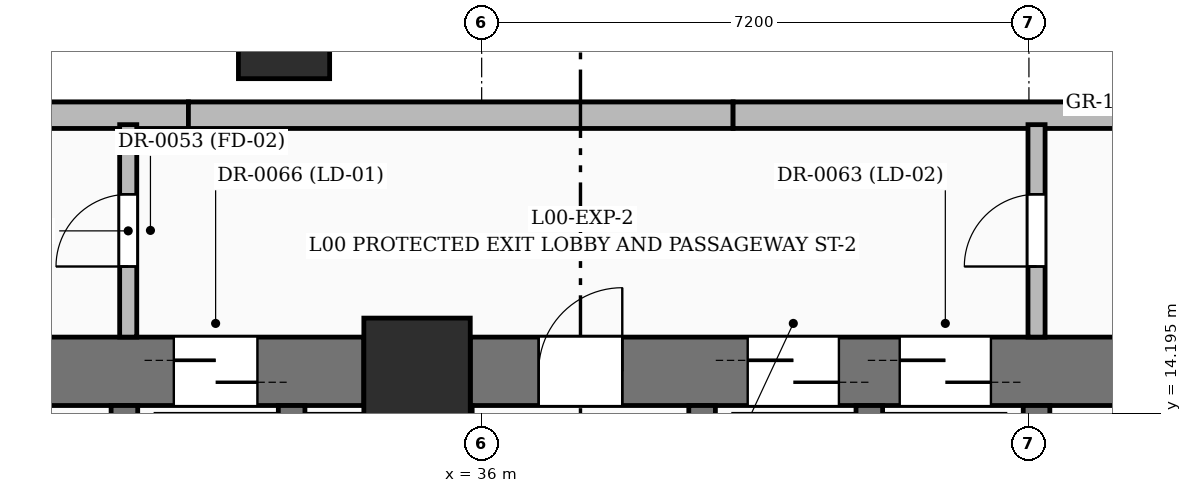
"""IFC4 building model, lengths in metres.
Left out: names, types, materials, properties, quantities, classifications, styles, units other than length and angle.
Written with IfcOpenShell. Run it as: python <this file> out.ifc"""

import sys

from ifc_helpers import new_model, si_unit, direction, frame, frame_2d, origin, origin_2d, place, context, subcontext, project, spatial, rectangle, extrude, element, fill, save


model = new_model("IFC4")
c1 = context("Model", 3, precision=1e-05, world=origin(), true_north=direction((0.0, 1.0)))
c2 = subcontext(c1, "Body", "Model", "MODEL_VIEW")
j1 = project(units=[si_unit("LENGTHUNIT", "METRE"), si_unit("PLANEANGLEUNIT", "RADIAN")], contexts=[c1])
p1 = place(None, origin())
s1 = spatial("IfcSite", under=j1, at=p1, CompositionType="ELEMENT")
p2 = place(p1, origin())
s2 = spatial("IfcBuilding", under=s1, at=p2, CompositionType="ELEMENT")
p3 = place(p2, origin())
s3 = spatial("IfcBuildingStorey", under=s2, at=p3, CompositionType="ELEMENT", Elevation=0.0)
p4 = place(p3, frame((35.15, 14.75, 0.0), z_axis=(0.0, 0.0, 1.0), x_axis=(1.0, 0.0, 0.0)))
e1 = element("IfcColumn", 1, at=p4, inside=s3, PredefinedType="COLUMN", context=c2, shape_type="SweptSolid", body=[
    extrude(rectangle(XDim=1.4, YDim=1.4, at=origin_2d()), origin(), (0.0, 0.0, 1.0), 8.4),
])
p5 = place(p3, frame((33.4, 19.2, 0.0), z_axis=(0.0, 0.0, 1.0), x_axis=(1.0, 0.0, 0.0)))
e2 = element("IfcColumn", 2, at=p5, inside=s3, PredefinedType="COLUMN", context=c2, shape_type="SweptSolid", body=[
    extrude(rectangle(XDim=1.2, YDim=1.2, at=origin_2d()), origin(), (0.0, 0.0, 1.0), 8.4),
])
p6 = place(p3, frame((28.25, 14.75, 0.0), z_axis=(0.0, 0.0, 1.0), x_axis=(1.0, 0.0, 0.0)))
e3 = element("IfcWall", 3, at=p6, inside=s3, PredefinedType="SHEAR", context=c2, shape_type="SweptSolid", body=[
    extrude(rectangle(XDim=6.2, YDim=0.9, at=frame_2d((3.1, 0.0))), origin(), (0.0, 0.0, 1.0), 8.4),
])
p7 = place(p6, frame((0.9, 0.0, 0.0)))
e4 = element("IfcOpeningElement", 4, at=p7, cuts=e3, PredefinedType="OPENING", context=c2, shape_type="SweptSolid", body=[
    extrude(rectangle(XDim=1.1, YDim=2.2, at=frame_2d((0.55, 1.1))), frame((0.0, 0.46, 0.0), z_axis=(0.0, -1.0, 0.0), x_axis=(1.0, 0.0, 0.0)), (0.0, 0.0, 1.0), 0.92),
])
p8 = place(p6, frame((3.7, 0.0, 0.0)))
e5 = element("IfcOpeningElement", 5, at=p8, cuts=e3, PredefinedType="OPENING", context=c2, shape_type="SweptSolid", body=[
    extrude(rectangle(XDim=1.1, YDim=2.2, at=frame_2d((0.55, 1.1))), frame((0.0, 0.46, 0.0), z_axis=(0.0, -1.0, 0.0), x_axis=(1.0, 0.0, 0.0)), (0.0, 0.0, 1.0), 0.92),
])
p9 = place(p3, frame((35.85, 14.75, 0.0), z_axis=(0.0, 0.0, 1.0), x_axis=(1.0, 0.0, 0.0)))
e6 = element("IfcWall", 6, at=p9, inside=s3, PredefinedType="SHEAR", context=c2, shape_type="SweptSolid", body=[
    extrude(rectangle(XDim=10.5, YDim=0.9, at=frame_2d((5.25, 0.0))), origin(), (0.0, 0.0, 1.0), 8.4),
])
p10 = place(p9, frame((0.9, 0.0, 0.0)))
e7 = element("IfcOpeningElement", 7, at=p10, cuts=e6, PredefinedType="OPENING", context=c2, shape_type="SweptSolid", body=[
    extrude(rectangle(XDim=1.1, YDim=2.2, at=frame_2d((0.55, 1.1))), frame((0.0, 0.46, 0.0), z_axis=(0.0, -1.0, 0.0), x_axis=(1.0, 0.0, 0.0)), (0.0, 0.0, 1.0), 0.92),
])
p11 = place(p9, frame((8.5, 0.0, 0.0)))
e8 = element("IfcOpeningElement", 8, at=p11, cuts=e6, PredefinedType="OPENING", context=c2, shape_type="SweptSolid", body=[
    extrude(rectangle(XDim=1.1, YDim=2.2, at=frame_2d((0.55, 1.1))), frame((0.0, 0.46, 0.0), z_axis=(0.0, -1.0, 0.0), x_axis=(1.0, 0.0, 0.0)), (0.0, 0.0, 1.0), 0.92),
])
p12 = place(p9, frame((3.65, 0.0, 0.0)))
e9 = element("IfcOpeningElement", 9, at=p12, cuts=e6, PredefinedType="OPENING", context=c2, shape_type="SweptSolid", body=[
    extrude(rectangle(XDim=1.2, YDim=2.2, at=frame_2d((0.6, 1.1))), frame((0.0, 0.46, 0.0), z_axis=(0.0, -1.0, 0.0), x_axis=(1.0, 0.0, 0.0)), (0.0, 0.0, 1.0), 0.92),
])
p13 = place(p9, frame((5.65, 0.0, 0.0)))
e10 = element("IfcOpeningElement", 10, at=p13, cuts=e6, PredefinedType="OPENING", context=c2, shape_type="SweptSolid", body=[
    extrude(rectangle(XDim=1.2, YDim=2.2, at=frame_2d((0.6, 1.1))), frame((0.0, 0.46, 0.0), z_axis=(0.0, -1.0, 0.0), x_axis=(1.0, 0.0, 0.0)), (0.0, 0.0, 1.0), 0.92),
])
p14 = place(p3, frame((31.3, 5.2, 0.0), z_axis=(0.0, 0.0, 1.0), x_axis=(0.0, 1.0, 0.0)))
e11 = element("IfcWall", 11, at=p14, inside=s3, PredefinedType="SOLIDWALL", context=c2, shape_type="SweptSolid", body=[
    extrude(rectangle(XDim=9.1, YDim=0.35, at=frame_2d((4.55, 0.0))), origin(), (0.0, 0.0, 1.0), 8.4),
])
p15 = place(p14, frame((6.02, 0.0, 0.0)))
e12 = element("IfcOpeningElement", 12, at=p15, cuts=e11, PredefinedType="OPENING", context=c2, shape_type="SweptSolid", body=[
    extrude(rectangle(XDim=1.0, YDim=2.15, at=frame_2d((0.5, 1.075))), frame((0.0, 0.185, 0.0), z_axis=(0.0, -1.0, 0.0), x_axis=(1.0, 0.0, 0.0)), (0.0, 0.0, 1.0), 0.37),
])
p16 = place(p3, frame((35.7, 5.2, 0.0), z_axis=(0.0, 0.0, 1.0), x_axis=(0.0, 1.0, 0.0)))
e13 = element("IfcWall", 13, at=p16, inside=s3, PredefinedType="SOLIDWALL", context=c2, shape_type="SweptSolid", body=[
    extrude(rectangle(XDim=9.1, YDim=0.35, at=frame_2d((4.55, 0.0))), origin(), (0.0, 0.0, 1.0), 8.4),
])
p17 = place(p16, frame((6.02, 0.0, 0.0)))
e14 = element("IfcOpeningElement", 14, at=p17, cuts=e13, PredefinedType="OPENING", context=c2, shape_type="SweptSolid", body=[
    extrude(rectangle(XDim=1.0, YDim=2.15, at=frame_2d((0.5, 1.075))), frame((0.0, 0.185, 0.0), z_axis=(0.0, -1.0, 0.0), x_axis=(1.0, 0.0, 0.0)), (0.0, 0.0, 1.0), 0.37),
])
p18 = place(p3, frame((38.9, 5.2, 0.0), z_axis=(0.0, 0.0, 1.0), x_axis=(0.0, 1.0, 0.0)))
e15 = element("IfcWall", 15, at=p18, inside=s3, PredefinedType="SOLIDWALL", context=c2, shape_type="SweptSolid", body=[
    extrude(rectangle(XDim=9.1, YDim=0.35, at=frame_2d((4.55, 0.0))), origin(), (0.0, 0.0, 1.0), 8.4),
])
p19 = place(p18, frame((6.02, 0.0, 0.0)))
e16 = element("IfcOpeningElement", 16, at=p19, cuts=e15, PredefinedType="OPENING", context=c2, shape_type="SweptSolid", body=[
    extrude(rectangle(XDim=1.0, YDim=2.15, at=frame_2d((0.5, 1.075))), frame((0.0, 0.185, 0.0), z_axis=(0.0, -1.0, 0.0), x_axis=(1.0, 0.0, 0.0)), (0.0, 0.0, 1.0), 0.37),
])
p20 = place(p3, frame((43.3, 5.2, 0.0), z_axis=(0.0, 0.0, 1.0), x_axis=(0.0, 1.0, 0.0)))
e17 = element("IfcWall", 17, at=p20, inside=s3, PredefinedType="SOLIDWALL", context=c2, shape_type="SweptSolid", body=[
    extrude(rectangle(XDim=9.1, YDim=0.35, at=frame_2d((4.55, 0.0))), origin(), (0.0, 0.0, 1.0), 8.4),
])
p21 = place(p20, frame((6.02, 0.0, 0.0)))
e18 = element("IfcOpeningElement", 18, at=p21, cuts=e17, PredefinedType="OPENING", context=c2, shape_type="SweptSolid", body=[
    extrude(rectangle(XDim=1.0, YDim=2.15, at=frame_2d((0.5, 1.075))), frame((0.0, 0.185, 0.0), z_axis=(0.0, -1.0, 0.0), x_axis=(1.0, 0.0, 0.0)), (0.0, 0.0, 1.0), 0.37),
])
for number, where, z_axis, x_axis in (
    (19, (33.5, 12.375, 0.0), (0.0, 0.0, 1.0), (0.0, 1.0, 0.0)),
    (20, (41.1, 12.375, 0.0), (0.0, 0.0, 1.0), (0.0, 1.0, 0.0)),
):
    element("IfcWall", number, at=place(p3, frame(where, z_axis=z_axis, x_axis=x_axis)), inside=s3, PredefinedType="SOLIDWALL", context=c2, shape_type="SweptSolid", body=[
        extrude(rectangle(XDim=1.925, YDim=0.35, at=frame_2d((0.962, 0.0))), origin(), (0.0, 0.0, 1.0), 8.4),
    ])
p22 = place(p3, frame((24.976, 18.12, 0.0), z_axis=(0.0, 0.0, 1.0), x_axis=(1.0, 0.0, 0.0)))
e21 = element("IfcWall", 21, at=p22, inside=s3, PredefinedType="SOLIDWALL", context=c2, shape_type="SweptSolid", body=[
    extrude(rectangle(XDim=7.166, YDim=0.35, at=frame_2d((3.583, 0.0))), origin(), (0.0, 0.0, 1.0), 7.467),
])
for number, where, z_axis, x_axis in (
    (22, (32.142, 18.12, 0.0), (0.0, 0.0, 1.0), (1.0, 0.0, 0.0)),
    (23, (39.308, 18.12, 0.0), (0.0, 0.0, 1.0), (1.0, 0.0, 0.0)),
):
    element("IfcWall", number, at=place(p3, frame(where, z_axis=z_axis, x_axis=x_axis)), inside=s3, PredefinedType="SOLIDWALL", context=c2, shape_type="SweptSolid", body=[
        extrude(rectangle(XDim=7.166, YDim=0.35, at=frame_2d((3.583, 0.0))), origin(), (0.0, 0.0, 1.0), 7.064),
    ])
p23 = place(p3, frame((31.35, 15.2, 0.0), z_axis=(0.0, 0.0, 1.0), x_axis=(0.0, 1.0, 0.0)))
e24 = element("IfcWall", 24, at=p23, inside=s3, PredefinedType="PARTITIONING", context=c2, shape_type="SweptSolid", body=[
    extrude(rectangle(XDim=2.795, YDim=0.225, at=frame_2d((1.397, 0.0))), origin(), (0.0, 0.0, 1.0), 8.1),
])
p24 = place(p23, frame((0.929, 0.0, 0.0)))
e25 = element("IfcOpeningElement", 25, at=p24, cuts=e24, PredefinedType="OPENING", context=c2, shape_type="SweptSolid", body=[
    extrude(rectangle(XDim=0.95, YDim=2.15, at=frame_2d((0.475, 1.075))), frame((0.0, 0.123, 0.0), z_axis=(0.0, -1.0, 0.0), x_axis=(1.0, 0.0, 0.0)), (0.0, 0.0, 1.0), 0.245),
])
p25 = place(p3, frame((43.3, 15.2, 0.0), z_axis=(0.0, 0.0, 1.0), x_axis=(0.0, 1.0, 0.0)))
e26 = element("IfcWall", 26, at=p25, inside=s3, PredefinedType="PARTITIONING", context=c2, shape_type="SweptSolid", body=[
    extrude(rectangle(XDim=2.795, YDim=0.225, at=frame_2d((1.397, 0.0))), origin(), (0.0, 0.0, 1.0), 8.1),
])
p26 = place(p25, frame((0.929, 0.0, 0.0)))
e27 = element("IfcOpeningElement", 27, at=p26, cuts=e26, PredefinedType="OPENING", context=c2, shape_type="SweptSolid", body=[
    extrude(rectangle(XDim=0.95, YDim=2.15, at=frame_2d((0.475, 1.075))), frame((0.0, 0.123, 0.0), z_axis=(0.0, -1.0, 0.0), x_axis=(1.0, 0.0, 0.0)), (0.0, 0.0, 1.0), 0.245),
])
p27 = place(p10, origin())
e28 = element("IfcDoor", 28, at=p27, inside=s3, OperationType="SINGLE_SWING_RIGHT", PredefinedType="DOOR", context=c2, shape_type="SweptSolid", body=[
    extrude(rectangle(XDim=1.1, YDim=2.2, at=frame_2d((0.55, 1.1))), frame((0.0, 0.025, 0.0), z_axis=(0.0, -1.0, 0.0), x_axis=(1.0, 0.0, 0.0)), (0.0, 0.0, 1.0), 0.05),
])
fill(e7, e28)
p28 = place(p8, origin())
e29 = element("IfcDoor", 29, at=p28, inside=s3, OperationType="DOUBLE_DOOR_SLIDING", PredefinedType="DOOR", context=c2, shape_type="SweptSolid", body=[
    extrude(rectangle(XDim=1.1, YDim=2.2, at=frame_2d((0.55, 1.1))), frame((0.0, 0.025, 0.0), z_axis=(0.0, -1.0, 0.0), x_axis=(1.0, 0.0, 0.0)), (0.0, 0.0, 1.0), 0.05),
])
fill(e5, e29)
p29 = place(p12, origin())
e30 = element("IfcDoor", 30, at=p29, inside=s3, OperationType="DOUBLE_DOOR_SLIDING", PredefinedType="DOOR", context=c2, shape_type="SweptSolid", body=[
    extrude(rectangle(XDim=1.2, YDim=2.2, at=frame_2d((0.6, 1.1))), frame((0.0, 0.025, 0.0), z_axis=(0.0, -1.0, 0.0), x_axis=(1.0, 0.0, 0.0)), (0.0, 0.0, 1.0), 0.05),
])
fill(e9, e30)
p30 = place(p13, origin())
e31 = element("IfcDoor", 31, at=p30, inside=s3, OperationType="DOUBLE_DOOR_SLIDING", PredefinedType="DOOR", context=c2, shape_type="SweptSolid", body=[
    extrude(rectangle(XDim=1.2, YDim=2.2, at=frame_2d((0.6, 1.1))), frame((0.0, 0.025, 0.0), z_axis=(0.0, -1.0, 0.0), x_axis=(1.0, 0.0, 0.0)), (0.0, 0.0, 1.0), 0.05),
])
fill(e10, e31)
p31 = place(p24, origin())
e32 = element("IfcDoor", 32, at=p31, inside=s3, OperationType="SINGLE_SWING_LEFT", PredefinedType="DOOR", context=c2, shape_type="SweptSolid", body=[
    extrude(rectangle(XDim=0.95, YDim=2.15, at=frame_2d((0.475, 1.075))), frame((0.0, 0.025, 0.0), z_axis=(0.0, -1.0, 0.0), x_axis=(1.0, 0.0, 0.0)), (0.0, 0.0, 1.0), 0.05),
])
fill(e25, e32)
p32 = place(p26, origin())
e33 = element("IfcDoor", 33, at=p32, inside=s3, OperationType="SINGLE_SWING_LEFT", PredefinedType="DOOR", context=c2, shape_type="SweptSolid", body=[
    extrude(rectangle(XDim=0.95, YDim=2.15, at=frame_2d((0.475, 1.075))), frame((0.0, 0.025, 0.0), z_axis=(0.0, -1.0, 0.0), x_axis=(1.0, 0.0, 0.0)), (0.0, 0.0, 1.0), 0.05),
])
fill(e27, e33)
save(model, sys.argv[1])
